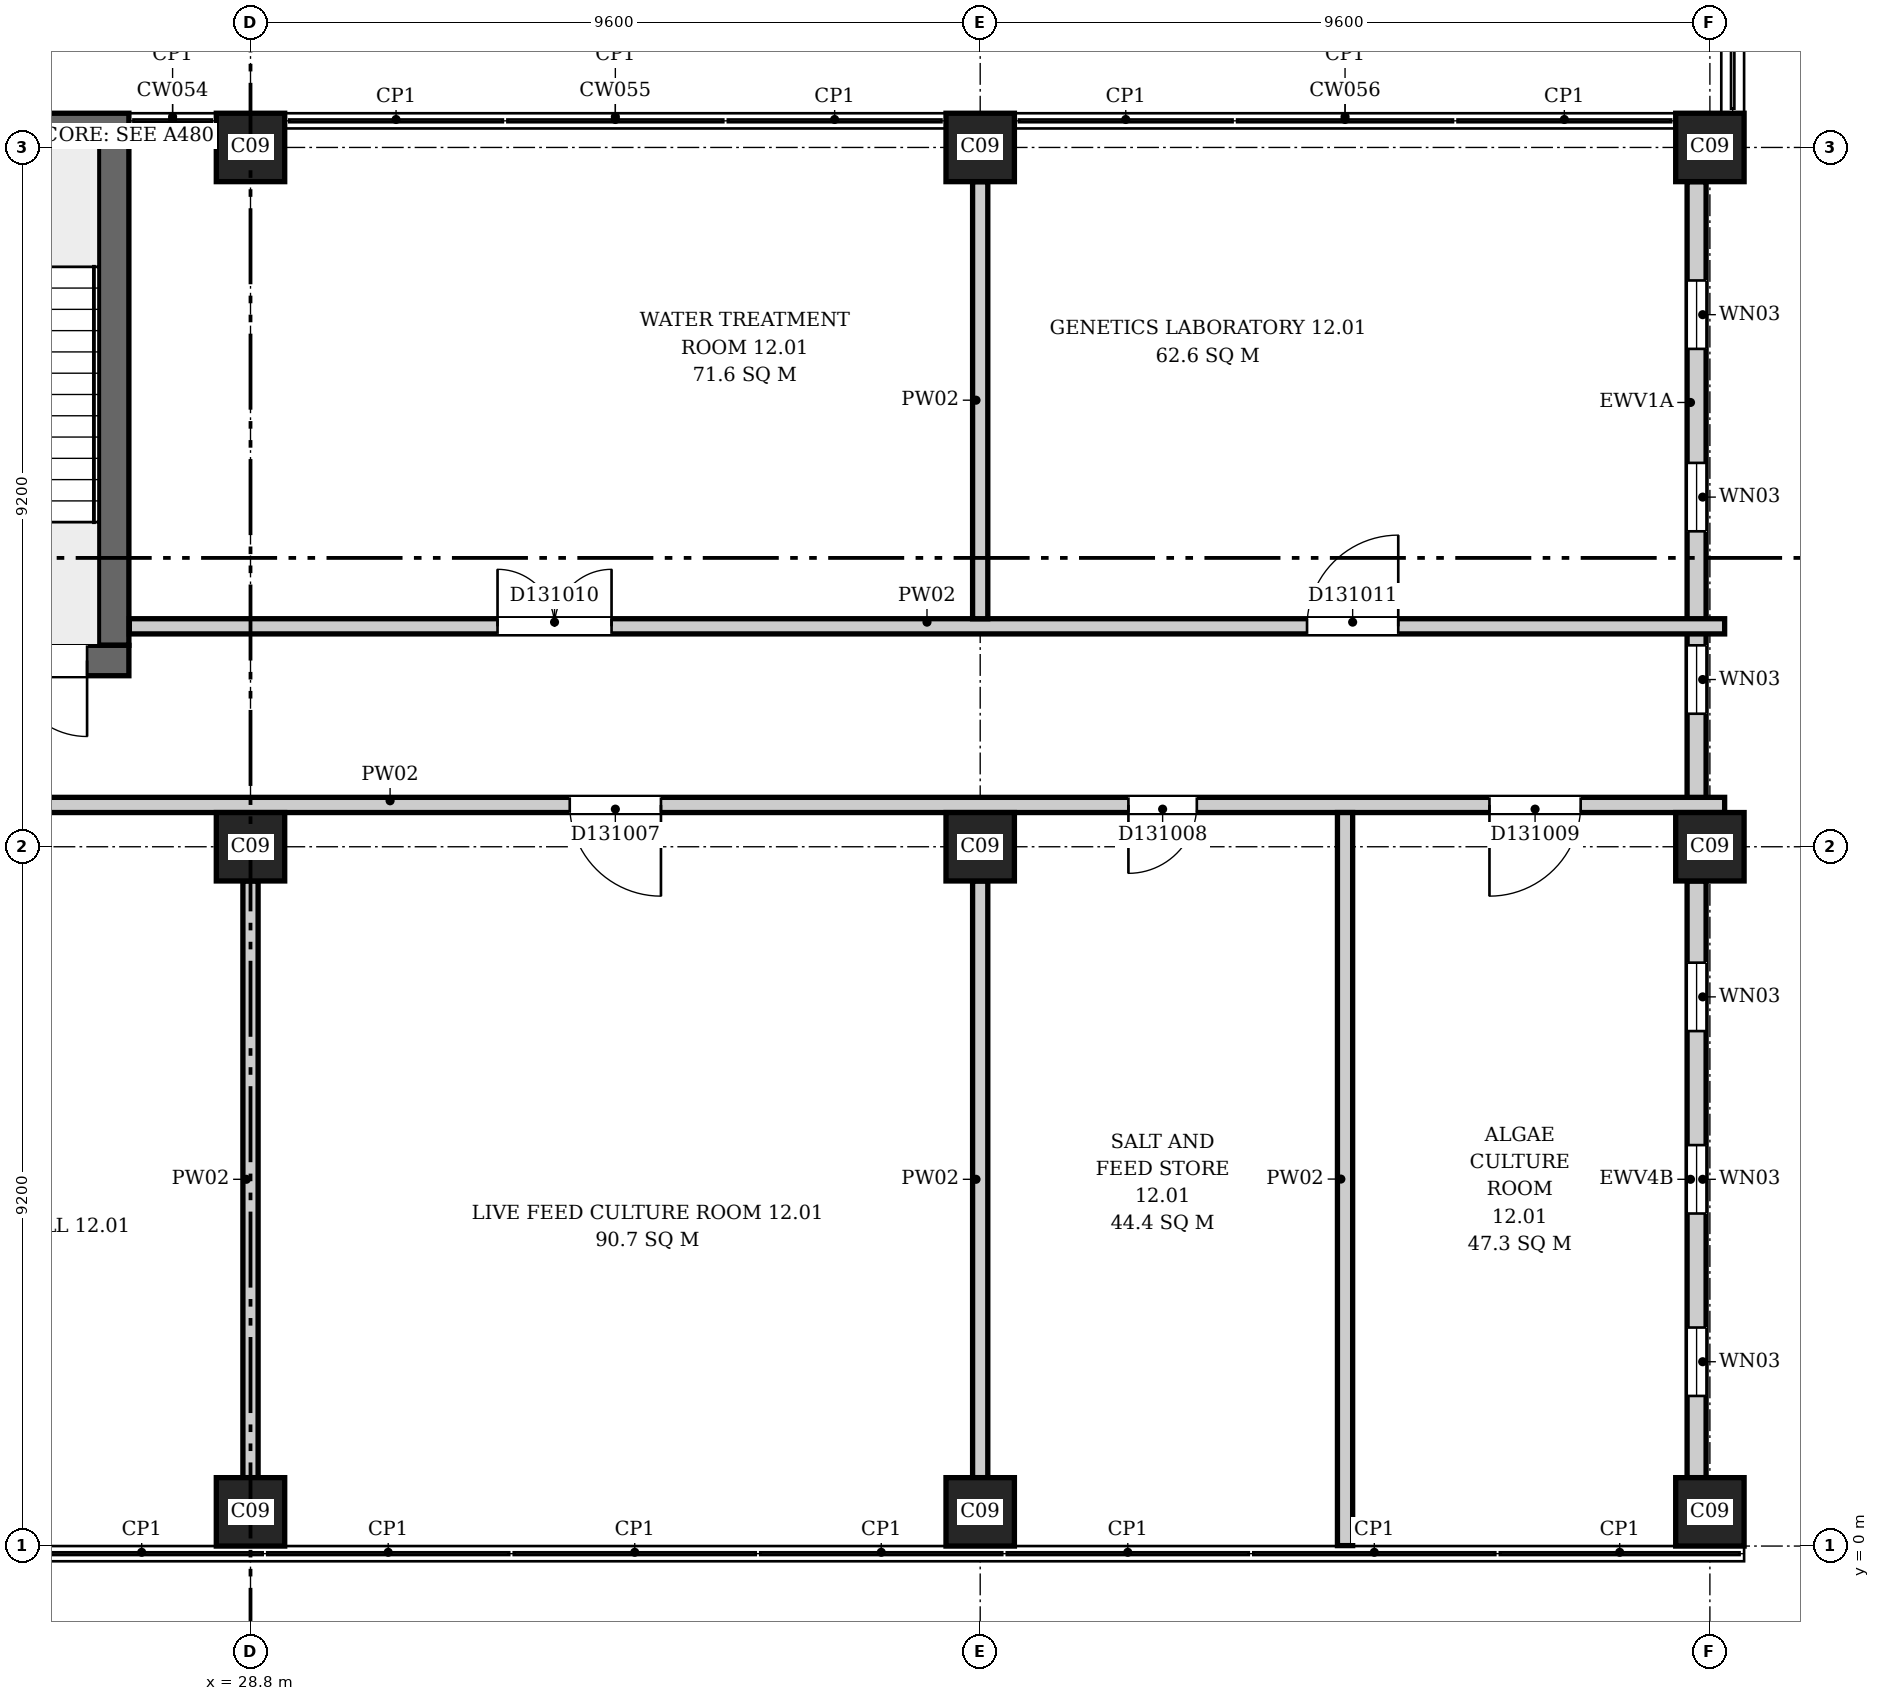
"""IFC4 building model, lengths in metres.
Left out: names, types, materials, properties, quantities, classifications, styles, units other than length and angle.
Written with IfcOpenShell. Run it as: python <this file> out.ifc"""

import sys

from ifc_helpers import new_model, si_unit, direction, frame, frame_2d, origin, origin_2d, place, context, subcontext, project, spatial, rectangle, extrude, element, fill, save


model = new_model("IFC4")
c1 = context("Model", 3, precision=1e-05, world=origin(), true_north=direction((0.0, 1.0)))
c2 = subcontext(c1, "Body", "Model", "MODEL_VIEW")
j1 = project(units=[si_unit("LENGTHUNIT", "METRE"), si_unit("PLANEANGLEUNIT", "RADIAN")], contexts=[c1])
p1 = place(None, origin())
s1 = spatial("IfcSite", under=j1, at=p1, CompositionType="ELEMENT")
p2 = place(p1, origin())
s2 = spatial("IfcBuilding", under=s1, at=p2, CompositionType="ELEMENT")
p3 = place(p2, frame((0.0, 0.0, 61.3)))
s3 = spatial("IfcBuildingStorey", under=s2, at=p3, CompositionType="ELEMENT", Elevation=61.3)
p4 = place(p3, frame((23.0, 11.65, 0.0), z_axis=(0.0, 0.0, 1.0), x_axis=(1.0, 0.0, 0.0)))
e1 = element("IfcWall", 1, at=p4, inside=s3, PredefinedType="SHEAR", context=c2, shape_type="SweptSolid", body=[
    extrude(rectangle(XDim=4.2, YDim=0.4, at=frame_2d((2.1, 0.0))), origin(), (0.0, 0.0, 1.0), 4.2),
])
p5 = place(p4, frame((0.55, 0.0, 0.0)))
e2 = element("IfcOpeningElement", 2, at=p5, cuts=e1, PredefinedType="OPENING", context=c2, shape_type="SweptSolid", body=[
    extrude(rectangle(XDim=1.0, YDim=2.1, at=frame_2d((0.5, 1.05))), frame((0.0, 0.21, 0.0), z_axis=(0.0, -1.0, 0.0), x_axis=(1.0, 0.0, 0.0)), (0.0, 0.0, 1.0), 0.42),
])
p6 = place(p4, frame((2.65, 0.0, 0.0)))
e3 = element("IfcOpeningElement", 3, at=p6, cuts=e1, PredefinedType="OPENING", context=c2, shape_type="SweptSolid", body=[
    extrude(rectangle(XDim=1.0, YDim=2.1, at=frame_2d((0.5, 1.05))), frame((0.0, 0.21, 0.0), z_axis=(0.0, -1.0, 0.0), x_axis=(1.0, 0.0, 0.0)), (0.0, 0.0, 1.0), 0.42),
])
p7 = place(p3, frame((23.0, 18.65, 0.0), z_axis=(0.0, 0.0, 1.0), x_axis=(1.0, 0.0, 0.0)))
e4 = element("IfcWall", 4, at=p7, inside=s3, PredefinedType="SHEAR", context=c2, shape_type="SweptSolid", body=[
    extrude(rectangle(XDim=4.2, YDim=0.4, at=frame_2d((2.1, 0.0))), origin(), (0.0, 0.0, 1.0), 4.2),
])
p8 = place(p3, frame((27.0, 11.85, 0.0), z_axis=(0.0, 0.0, 1.0), x_axis=(0.0, 1.0, 0.0)))
e5 = element("IfcWall", 5, at=p8, inside=s3, PredefinedType="SHEAR", context=c2, shape_type="SweptSolid", body=[
    extrude(rectangle(XDim=6.6, YDim=0.4, at=frame_2d((3.3, 0.0))), origin(), (0.0, 0.0, 1.0), 4.2),
])
for number, where, z_axis, x_axis in (
    (6, (28.8, 0.45, 0.0), (0.0, 0.0, 1.0), (1.0, 0.0, 0.0)),
    (7, (38.4, 0.45, 0.0), (0.0, 0.0, 1.0), (1.0, 0.0, 0.0)),
    (8, (48.0, 0.45, 0.0), (0.0, 0.0, 1.0), (1.0, 0.0, 0.0)),
    (9, (28.8, 9.2, 0.0), (0.0, 0.0, 1.0), (1.0, 0.0, 0.0)),
    (10, (38.4, 9.2, 0.0), (0.0, 0.0, 1.0), (1.0, 0.0, 0.0)),
    (11, (48.0, 9.2, 0.0), (0.0, 0.0, 1.0), (1.0, 0.0, 0.0)),
    (12, (28.8, 18.4, 0.0), (0.0, 0.0, 1.0), (1.0, 0.0, 0.0)),
    (13, (38.4, 18.4, 0.0), (0.0, 0.0, 1.0), (1.0, 0.0, 0.0)),
    (14, (48.0, 18.4, 0.0), (0.0, 0.0, 1.0), (1.0, 0.0, 0.0)),
):
    element("IfcColumn", number, at=place(p3, frame(where, z_axis=z_axis, x_axis=x_axis)), inside=s3, PredefinedType="COLUMN", context=c2, shape_type="SweptSolid", body=[
        extrude(rectangle(XDim=0.9, YDim=0.9, at=origin_2d()), origin(), (0.0, 0.0, 1.0), 4.2),
    ])
p9 = place(p3, frame((47.825, 0.9, 0.0), z_axis=(0.0, 0.0, 1.0), x_axis=(0.0, 1.0, 0.0)))
e15 = element("IfcWall", 15, at=p9, inside=s3, PredefinedType="ELEMENTEDWALL", context=c2, shape_type="SweptSolid", body=[
    extrude(rectangle(XDim=7.85, YDim=0.25, at=frame_2d((3.925, 0.0))), origin(), (0.0, 0.0, 1.0), 3.3),
])
p10 = place(p9, frame((1.075, 0.0, 0.6)))
e16 = element("IfcOpeningElement", 16, at=p10, cuts=e15, PredefinedType="OPENING", context=c2, shape_type="SweptSolid", body=[
    extrude(rectangle(XDim=0.9, YDim=2.6, at=frame_2d((0.45, 1.3))), frame((0.0, 0.135, 0.0), z_axis=(0.0, -1.0, 0.0), x_axis=(1.0, 0.0, 0.0)), (0.0, 0.0, 1.0), 0.27),
])
p11 = place(p9, frame((3.475, 0.0, 0.6)))
e17 = element("IfcOpeningElement", 17, at=p11, cuts=e15, PredefinedType="OPENING", context=c2, shape_type="SweptSolid", body=[
    extrude(rectangle(XDim=0.9, YDim=2.6, at=frame_2d((0.45, 1.3))), frame((0.0, 0.135, 0.0), z_axis=(0.0, -1.0, 0.0), x_axis=(1.0, 0.0, 0.0)), (0.0, 0.0, 1.0), 0.27),
])
p12 = place(p9, frame((5.875, 0.0, 0.6)))
e18 = element("IfcOpeningElement", 18, at=p12, cuts=e15, PredefinedType="OPENING", context=c2, shape_type="SweptSolid", body=[
    extrude(rectangle(XDim=0.9, YDim=2.6, at=frame_2d((0.45, 1.3))), frame((0.0, 0.135, 0.0), z_axis=(0.0, -1.0, 0.0), x_axis=(1.0, 0.0, 0.0)), (0.0, 0.0, 1.0), 0.27),
])
p13 = place(p3, frame((47.825, 9.65, 0.0), z_axis=(0.0, 0.0, 1.0), x_axis=(0.0, 1.0, 0.0)))
e19 = element("IfcWall", 19, at=p13, inside=s3, PredefinedType="ELEMENTEDWALL", context=c2, shape_type="SweptSolid", body=[
    extrude(rectangle(XDim=8.3, YDim=0.25, at=frame_2d((4.15, 0.0))), origin(), (0.0, 0.0, 1.0), 3.3),
])
p14 = place(p13, frame((1.3, 0.0, 0.6)))
e20 = element("IfcOpeningElement", 20, at=p14, cuts=e19, PredefinedType="OPENING", context=c2, shape_type="SweptSolid", body=[
    extrude(rectangle(XDim=0.9, YDim=2.6, at=frame_2d((0.45, 1.3))), frame((0.0, 0.135, 0.0), z_axis=(0.0, -1.0, 0.0), x_axis=(1.0, 0.0, 0.0)), (0.0, 0.0, 1.0), 0.27),
])
p15 = place(p13, frame((3.7, 0.0, 0.6)))
e21 = element("IfcOpeningElement", 21, at=p15, cuts=e19, PredefinedType="OPENING", context=c2, shape_type="SweptSolid", body=[
    extrude(rectangle(XDim=0.9, YDim=2.6, at=frame_2d((0.45, 1.3))), frame((0.0, 0.135, 0.0), z_axis=(0.0, -1.0, 0.0), x_axis=(1.0, 0.0, 0.0)), (0.0, 0.0, 1.0), 0.27),
])
p16 = place(p13, frame((6.1, 0.0, 0.6)))
e22 = element("IfcOpeningElement", 22, at=p16, cuts=e19, PredefinedType="OPENING", context=c2, shape_type="SweptSolid", body=[
    extrude(rectangle(XDim=0.9, YDim=2.6, at=frame_2d((0.45, 1.3))), frame((0.0, 0.135, 0.0), z_axis=(0.0, -1.0, 0.0), x_axis=(1.0, 0.0, 0.0)), (0.0, 0.0, 1.0), 0.27),
])
p17 = place(p3, frame((4.3, 9.75, 0.0), z_axis=(0.0, 0.0, 1.0), x_axis=(1.0, 0.0, 0.0)))
e23 = element("IfcWall", 23, at=p17, inside=s3, PredefinedType="PARTITIONING", context=c2, shape_type="SweptSolid", body=[
    extrude(rectangle(XDim=43.894, YDim=0.2, at=frame_2d((21.947, 0.0))), origin(), (0.0, 0.0, 1.0), 3.9),
])
p18 = place(p17, frame((18.8, 0.0, 0.0)))
e24 = element("IfcOpeningElement", 24, at=p18, cuts=e23, PredefinedType="OPENING", context=c2, shape_type="SweptSolid", body=[
    extrude(rectangle(XDim=1.8, YDim=2.1, at=frame_2d((0.9, 1.05))), frame((0.0, 0.11, 0.0), z_axis=(0.0, -1.0, 0.0), x_axis=(1.0, 0.0, 0.0)), (0.0, 0.0, 1.0), 0.22),
])
p19 = place(p17, frame((28.7, 0.0, 0.0)))
e25 = element("IfcOpeningElement", 25, at=p19, cuts=e23, PredefinedType="OPENING", context=c2, shape_type="SweptSolid", body=[
    extrude(rectangle(XDim=1.2, YDim=2.1, at=frame_2d((0.6, 1.05))), frame((0.0, 0.11, 0.0), z_axis=(0.0, -1.0, 0.0), x_axis=(1.0, 0.0, 0.0)), (0.0, 0.0, 1.0), 0.22),
])
p20 = place(p17, frame((36.05, 0.0, 0.0)))
e26 = element("IfcOpeningElement", 26, at=p20, cuts=e23, PredefinedType="OPENING", context=c2, shape_type="SweptSolid", body=[
    extrude(rectangle(XDim=0.9, YDim=2.1, at=frame_2d((0.45, 1.05))), frame((0.0, 0.11, 0.0), z_axis=(0.0, -1.0, 0.0), x_axis=(1.0, 0.0, 0.0)), (0.0, 0.0, 1.0), 0.22),
])
p21 = place(p17, frame((40.8, 0.0, 0.0)))
e27 = element("IfcOpeningElement", 27, at=p21, cuts=e23, PredefinedType="OPENING", context=c2, shape_type="SweptSolid", body=[
    extrude(rectangle(XDim=1.2, YDim=2.1, at=frame_2d((0.6, 1.05))), frame((0.0, 0.11, 0.0), z_axis=(0.0, -1.0, 0.0), x_axis=(1.0, 0.0, 0.0)), (0.0, 0.0, 1.0), 0.22),
])
p22 = place(p3, frame((27.206, 12.1, 0.0), z_axis=(0.0, 0.0, 1.0), x_axis=(1.0, 0.0, 0.0)))
e28 = element("IfcWall", 28, at=p22, inside=s3, PredefinedType="PARTITIONING", context=c2, shape_type="SweptSolid", body=[
    extrude(rectangle(XDim=20.988, YDim=0.2, at=frame_2d((10.494, 0.0))), origin(), (0.0, 0.0, 1.0), 3.9),
])
p23 = place(p22, frame((4.844, 0.0, 0.0)))
e29 = element("IfcOpeningElement", 29, at=p23, cuts=e28, PredefinedType="OPENING", context=c2, shape_type="SweptSolid", body=[
    extrude(rectangle(XDim=1.5, YDim=2.1, at=frame_2d((0.75, 1.05))), frame((0.0, 0.11, 0.0), z_axis=(0.0, -1.0, 0.0), x_axis=(1.0, 0.0, 0.0)), (0.0, 0.0, 1.0), 0.22),
])
p24 = place(p22, frame((15.494, 0.0, 0.0)))
e30 = element("IfcOpeningElement", 30, at=p24, cuts=e28, PredefinedType="OPENING", context=c2, shape_type="SweptSolid", body=[
    extrude(rectangle(XDim=1.2, YDim=2.1, at=frame_2d((0.6, 1.05))), frame((0.0, 0.11, 0.0), z_axis=(0.0, -1.0, 0.0), x_axis=(1.0, 0.0, 0.0)), (0.0, 0.0, 1.0), 0.22),
])
for number, where, z_axis, x_axis in (
    (31, (28.8, 0.9, 0.0), (0.0, 0.0, 1.0), (0.0, 1.0, 0.0)),
    (32, (38.4, 0.9, 0.0), (0.0, 0.0, 1.0), (0.0, 1.0, 0.0)),
):
    element("IfcWall", number, at=place(p3, frame(where, z_axis=z_axis, x_axis=x_axis)), inside=s3, PredefinedType="PARTITIONING", context=c2, shape_type="SweptSolid", body=[
        extrude(rectangle(XDim=7.85, YDim=0.2, at=frame_2d((3.925, 0.0))), origin(), (0.0, 0.0, 1.0), 3.9),
    ])
p25 = place(p3, frame((38.4, 12.2, 0.0), z_axis=(0.0, 0.0, 1.0), x_axis=(0.0, 1.0, 0.0)))
e33 = element("IfcWall", 33, at=p25, inside=s3, PredefinedType="PARTITIONING", context=c2, shape_type="SweptSolid", body=[
    extrude(rectangle(XDim=5.75, YDim=0.2, at=frame_2d((2.875, 0.0))), origin(), (0.0, 0.0, 1.0), 3.9),
])
p26 = place(p3, frame((43.2, 0.006, 0.0), z_axis=(0.0, 0.0, 1.0), x_axis=(0.0, 1.0, 0.0)))
e34 = element("IfcWall", 34, at=p26, inside=s3, PredefinedType="PARTITIONING", context=c2, shape_type="SweptSolid", body=[
    extrude(rectangle(XDim=9.644, YDim=0.2, at=frame_2d((4.822, 0.0))), origin(), (0.0, 0.0, 1.0), 3.9),
])
p27 = place(p10, origin())
e35 = element("IfcWindow", 35, at=p27, inside=s3, PartitioningType="SINGLE_PANEL", PredefinedType="WINDOW", context=c2, shape_type="SweptSolid", body=[
    extrude(rectangle(XDim=0.9, YDim=2.6, at=frame_2d((0.45, 1.3))), frame((0.0, 0.03, 0.0), z_axis=(0.0, -1.0, 0.0), x_axis=(1.0, 0.0, 0.0)), (0.0, 0.0, 1.0), 0.06),
])
fill(e16, e35)
p28 = place(p11, origin())
e36 = element("IfcWindow", 36, at=p28, inside=s3, PartitioningType="SINGLE_PANEL", PredefinedType="WINDOW", context=c2, shape_type="SweptSolid", body=[
    extrude(rectangle(XDim=0.9, YDim=2.6, at=frame_2d((0.45, 1.3))), frame((0.0, 0.03, 0.0), z_axis=(0.0, -1.0, 0.0), x_axis=(1.0, 0.0, 0.0)), (0.0, 0.0, 1.0), 0.06),
])
fill(e17, e36)
p29 = place(p12, origin())
e37 = element("IfcWindow", 37, at=p29, inside=s3, PartitioningType="SINGLE_PANEL", PredefinedType="WINDOW", context=c2, shape_type="SweptSolid", body=[
    extrude(rectangle(XDim=0.9, YDim=2.6, at=frame_2d((0.45, 1.3))), frame((0.0, 0.03, 0.0), z_axis=(0.0, -1.0, 0.0), x_axis=(1.0, 0.0, 0.0)), (0.0, 0.0, 1.0), 0.06),
])
fill(e18, e37)
p30 = place(p14, origin())
e38 = element("IfcWindow", 38, at=p30, inside=s3, PartitioningType="SINGLE_PANEL", PredefinedType="WINDOW", context=c2, shape_type="SweptSolid", body=[
    extrude(rectangle(XDim=0.9, YDim=2.6, at=frame_2d((0.45, 1.3))), frame((0.0, 0.03, 0.0), z_axis=(0.0, -1.0, 0.0), x_axis=(1.0, 0.0, 0.0)), (0.0, 0.0, 1.0), 0.06),
])
fill(e20, e38)
p31 = place(p15, origin())
e39 = element("IfcWindow", 39, at=p31, inside=s3, PartitioningType="SINGLE_PANEL", PredefinedType="WINDOW", context=c2, shape_type="SweptSolid", body=[
    extrude(rectangle(XDim=0.9, YDim=2.6, at=frame_2d((0.45, 1.3))), frame((0.0, 0.03, 0.0), z_axis=(0.0, -1.0, 0.0), x_axis=(1.0, 0.0, 0.0)), (0.0, 0.0, 1.0), 0.06),
])
fill(e21, e39)
p32 = place(p16, origin())
e40 = element("IfcWindow", 40, at=p32, inside=s3, PartitioningType="SINGLE_PANEL", PredefinedType="WINDOW", context=c2, shape_type="SweptSolid", body=[
    extrude(rectangle(XDim=0.9, YDim=2.6, at=frame_2d((0.45, 1.3))), frame((0.0, 0.03, 0.0), z_axis=(0.0, -1.0, 0.0), x_axis=(1.0, 0.0, 0.0)), (0.0, 0.0, 1.0), 0.06),
])
fill(e22, e40)
p33 = place(p6, origin())
e41 = element("IfcDoor", 41, at=p33, inside=s3, OperationType="SINGLE_SWING_LEFT", PredefinedType="DOOR", context=c2, shape_type="SweptSolid", body=[
    extrude(rectangle(XDim=1.0, YDim=2.1, at=frame_2d((0.5, 1.05))), frame((0.0, 0.025, 0.0), z_axis=(0.0, -1.0, 0.0), x_axis=(1.0, 0.0, 0.0)), (0.0, 0.0, 1.0), 0.05),
])
fill(e3, e41)
p34 = place(p19, origin())
e42 = element("IfcDoor", 42, at=p34, inside=s3, OperationType="SINGLE_SWING_RIGHT", PredefinedType="DOOR", context=c2, shape_type="SweptSolid", body=[
    extrude(rectangle(XDim=1.2, YDim=2.1, at=frame_2d((0.6, 1.05))), frame((0.0, 0.025, 0.0), z_axis=(0.0, -1.0, 0.0), x_axis=(1.0, 0.0, 0.0)), (0.0, 0.0, 1.0), 0.05),
])
fill(e25, e42)
p35 = place(p20, origin())
e43 = element("IfcDoor", 43, at=p35, inside=s3, OperationType="SINGLE_SWING_LEFT", PredefinedType="DOOR", context=c2, shape_type="SweptSolid", body=[
    extrude(rectangle(XDim=0.9, YDim=2.1, at=frame_2d((0.45, 1.05))), frame((0.0, 0.025, 0.0), z_axis=(0.0, -1.0, 0.0), x_axis=(1.0, 0.0, 0.0)), (0.0, 0.0, 1.0), 0.05),
])
fill(e26, e43)
p36 = place(p21, origin())
e44 = element("IfcDoor", 44, at=p36, inside=s3, OperationType="SINGLE_SWING_LEFT", PredefinedType="DOOR", context=c2, shape_type="SweptSolid", body=[
    extrude(rectangle(XDim=1.2, YDim=2.1, at=frame_2d((0.6, 1.05))), frame((0.0, 0.025, 0.0), z_axis=(0.0, -1.0, 0.0), x_axis=(1.0, 0.0, 0.0)), (0.0, 0.0, 1.0), 0.05),
])
fill(e27, e44)
p37 = place(p23, origin())
e45 = element("IfcDoor", 45, at=p37, inside=s3, OperationType="DOUBLE_DOOR_SINGLE_SWING", PredefinedType="DOOR", context=c2, shape_type="SweptSolid", body=[
    extrude(rectangle(XDim=1.5, YDim=2.1, at=frame_2d((0.75, 1.05))), frame((0.0, 0.025, 0.0), z_axis=(0.0, -1.0, 0.0), x_axis=(1.0, 0.0, 0.0)), (0.0, 0.0, 1.0), 0.05),
])
fill(e29, e45)
p38 = place(p24, origin())
e46 = element("IfcDoor", 46, at=p38, inside=s3, OperationType="SINGLE_SWING_RIGHT", PredefinedType="DOOR", context=c2, shape_type="SweptSolid", body=[
    extrude(rectangle(XDim=1.2, YDim=2.1, at=frame_2d((0.6, 1.05))), frame((0.0, 0.025, 0.0), z_axis=(0.0, -1.0, 0.0), x_axis=(1.0, 0.0, 0.0)), (0.0, 0.0, 1.0), 0.05),
])
fill(e30, e46)
save(model, sys.argv[1])
